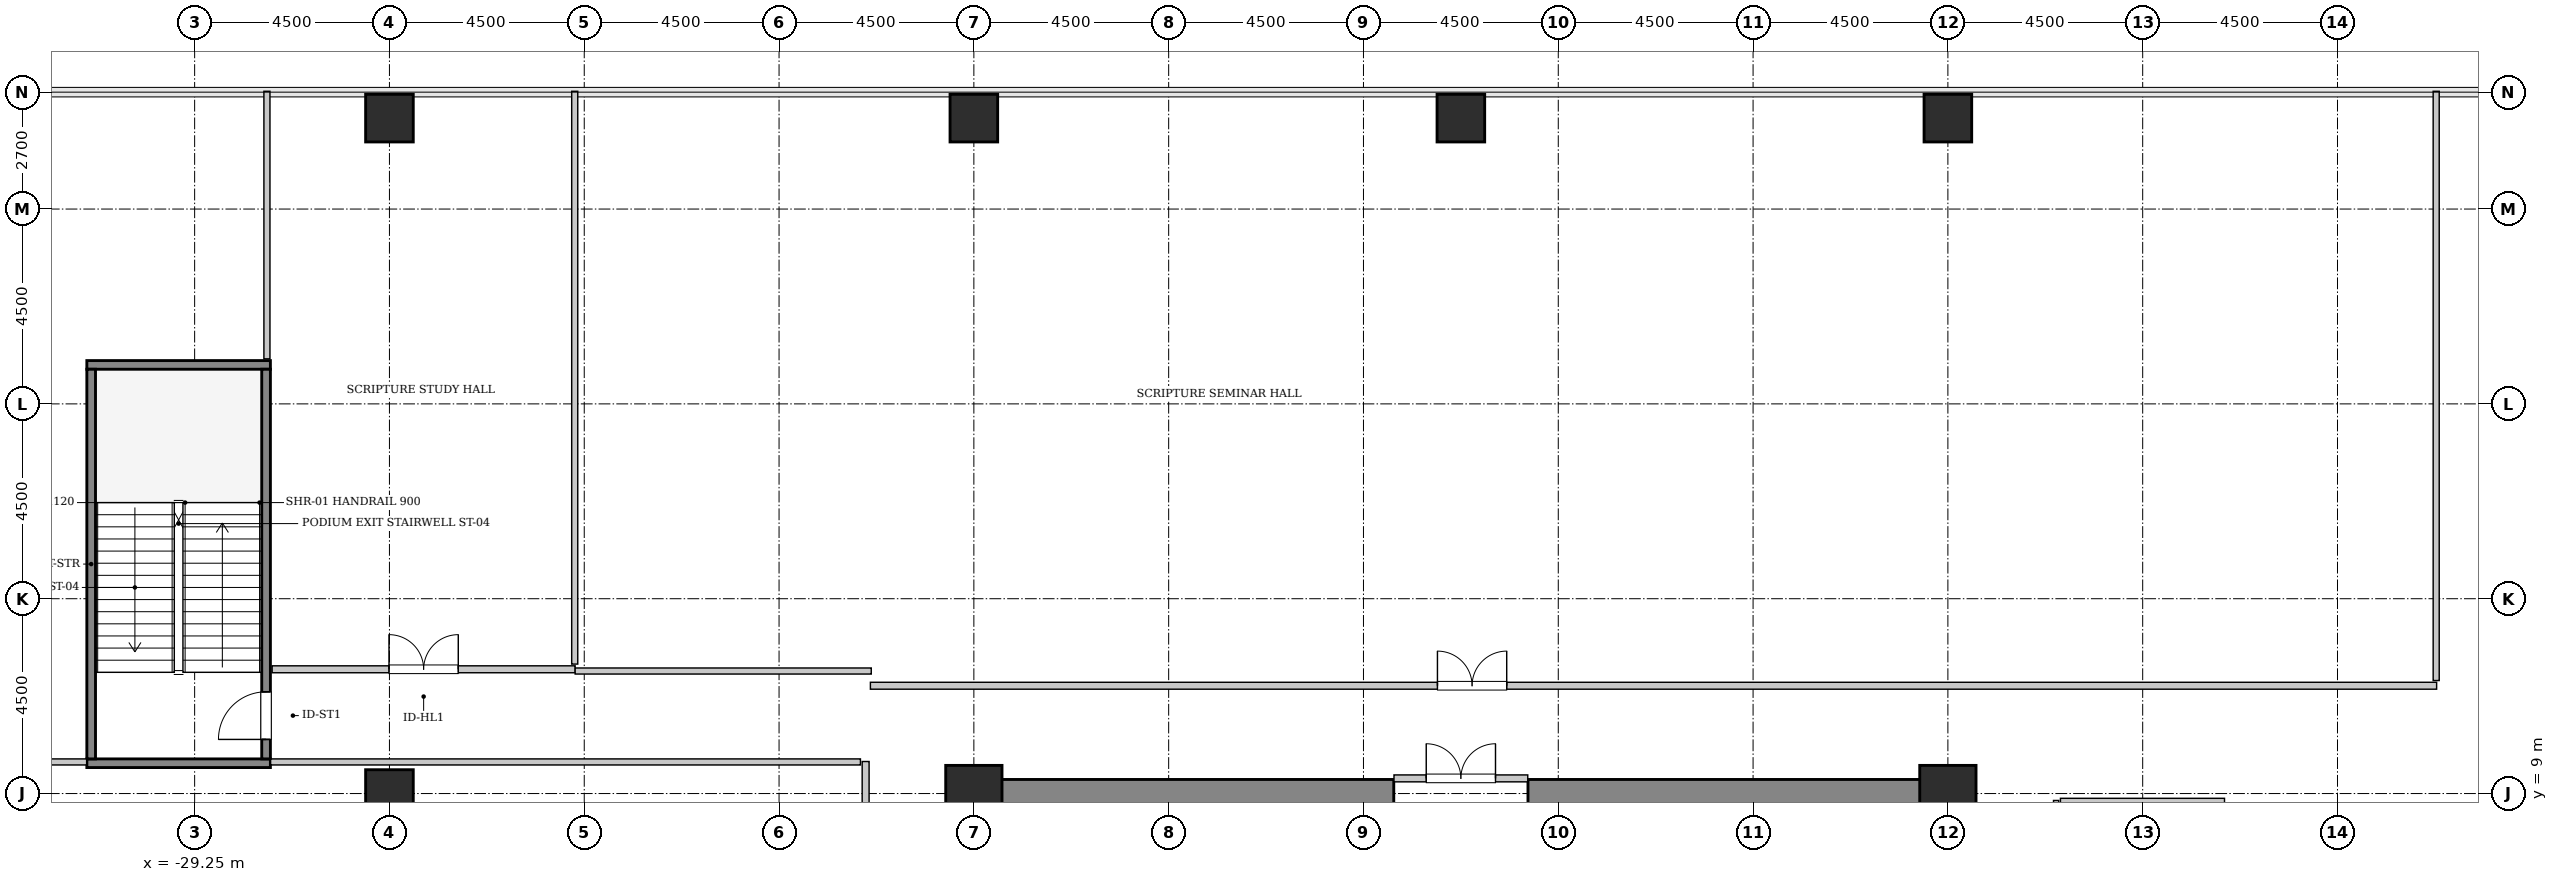
"""IFC4 building model, lengths in metres.
Left out: names, types, materials, properties, quantities, classifications, styles, units other than length and angle.
Written with IfcOpenShell. Run it as: python <this file> out.ifc"""

import sys

from ifc_helpers import new_model, si_unit, direction, frame, frame_2d, origin, origin_2d, place, context, subcontext, project, spatial, rectangle, hollow_rectangle, extrude, source, transform, mapped, element, fill, save


model = new_model("IFC4")
c1 = context("Model", 3, precision=1e-05, world=origin(), true_north=direction((0.0, 1.0)))
c2 = subcontext(c1, "Body", "Model", "MODEL_VIEW")
j1 = project(units=[si_unit("LENGTHUNIT", "METRE"), si_unit("PLANEANGLEUNIT", "RADIAN")], contexts=[c1])
p1 = place(None, origin())
s1 = spatial("IfcSite", under=j1, at=p1, CompositionType="ELEMENT")
p2 = place(p1, origin())
s2 = spatial("IfcBuilding", under=s1, at=p2, CompositionType="ELEMENT")
p3 = place(p2, frame((0.0, 0.0, 6.0)))
s3 = spatial("IfcBuildingStorey", under=s2, at=p3, CompositionType="ELEMENT", Elevation=6.0)
m1 = source(origin(), c2, "Body", "SweptSolid", [
    extrude(rectangle(XDim=10.025, YDim=0.65, at=frame_2d((5.012, 0.0))), origin(), (0.0, 0.0, 1.0), 5.4),
])
for number, where, z_axis, x_axis in (
    (1, (-11.575, 9.0, 0.0), (0.0, 0.0, 1.0), (1.0, 0.0, 0.0)),
    (2, (1.55, 9.0, 0.0), (0.0, 0.0, 1.0), (1.0, 0.0, 0.0)),
):
    element("IfcWall", number, at=place(p3, frame(where, z_axis=z_axis, x_axis=x_axis)), inside=s3, PredefinedType="SHEAR", context=c2, shape_type="MappedRepresentation", body=[
        mapped(m1, transform((0.0, 0.0, 0.0), x_axis=(1.0, 0.0, 0.0), y_axis=(0.0, 1.0, 0.0), z_axis=(0.0, 0.0, 1.0), scale=1.0)),
    ])
m2 = source(origin(), c2, "Body", "SweptSolid", [
    extrude(hollow_rectangle(XDim=1.1, YDim=1.1, WallThickness=0.055, InnerFilletRadius=0.055, OuterFilletRadius=0.11, at=origin_2d()), origin(), (0.0, 0.0, 1.0), 5.4),
])
p4 = place(p3, frame((-24.75, 9.0, 0.0), z_axis=(0.0, 0.0, 1.0), x_axis=(1.0, 0.0, 0.0)))
e3 = element("IfcColumn", 3, at=p4, inside=s3, PredefinedType="COLUMN", context=c2, shape_type="MappedRepresentation", body=[
    mapped(m2, transform((0.0, 0.0, 0.0), x_axis=(1.0, 0.0, 0.0), y_axis=(0.0, 1.0, 0.0), z_axis=(0.0, 0.0, 1.0), scale=1.0)),
])
m3 = source(origin(), c2, "Body", "SweptSolid", [
    extrude(hollow_rectangle(XDim=1.1, YDim=1.1, WallThickness=0.055, InnerFilletRadius=0.055, OuterFilletRadius=0.11, at=origin_2d()), origin(), (0.0, 0.0, 1.0), 5.4),
])
p5 = place(p3, frame((-24.75, 24.6, 0.0), z_axis=(0.0, 0.0, 1.0), x_axis=(1.0, 0.0, 0.0)))
e4 = element("IfcColumn", 4, at=p5, inside=s3, PredefinedType="COLUMN", context=c2, shape_type="MappedRepresentation", body=[
    mapped(m3, transform((0.0, 0.0, 0.0), x_axis=(1.0, 0.0, 0.0), y_axis=(0.0, 1.0, 0.0), z_axis=(0.0, 0.0, 1.0), scale=1.0)),
])
m4 = source(origin(), c2, "Body", "SweptSolid", [
    extrude(hollow_rectangle(XDim=1.3, YDim=1.3, WallThickness=0.065, InnerFilletRadius=0.065, OuterFilletRadius=0.13, at=origin_2d()), origin(), (0.0, 0.0, 1.0), 5.4),
])
p6 = place(p3, frame((-11.25, 9.0, 0.0), z_axis=(0.0, 0.0, 1.0), x_axis=(1.0, 0.0, 0.0)))
e5 = element("IfcColumn", 5, at=p6, inside=s3, PredefinedType="COLUMN", context=c2, shape_type="MappedRepresentation", body=[
    mapped(m4, transform((0.0, 0.0, 0.0), x_axis=(1.0, 0.0, 0.0), y_axis=(0.0, 1.0, 0.0), z_axis=(0.0, 0.0, 1.0), scale=1.0)),
])
for number, where, z_axis, x_axis in (
    (6, (-11.25, 24.6, 0.0), (0.0, 0.0, 1.0), (1.0, 0.0, 0.0)),
    (7, (0.0, 24.6, 0.0), (0.0, 0.0, 1.0), (1.0, 0.0, 0.0)),
):
    element("IfcColumn", number, at=place(p3, frame(where, z_axis=z_axis, x_axis=x_axis)), inside=s3, PredefinedType="COLUMN", context=c2, shape_type="MappedRepresentation", body=[
        mapped(m3, transform((0.0, 0.0, 0.0), x_axis=(1.0, 0.0, 0.0), y_axis=(0.0, 1.0, 0.0), z_axis=(0.0, 0.0, 1.0), scale=1.0)),
    ])
p7 = place(p3, frame((11.25, 9.0, 0.0), z_axis=(0.0, 0.0, 1.0), x_axis=(1.0, 0.0, 0.0)))
e8 = element("IfcColumn", 8, at=p7, inside=s3, PredefinedType="COLUMN", context=c2, shape_type="MappedRepresentation", body=[
    mapped(m4, transform((0.0, 0.0, 0.0), x_axis=(1.0, 0.0, 0.0), y_axis=(0.0, 1.0, 0.0), z_axis=(0.0, 0.0, 1.0), scale=1.0)),
])
p8 = place(p3, frame((11.25, 24.6, 0.0), z_axis=(0.0, 0.0, 1.0), x_axis=(1.0, 0.0, 0.0)))
e9 = element("IfcColumn", 9, at=p8, inside=s3, PredefinedType="COLUMN", context=c2, shape_type="MappedRepresentation", body=[
    mapped(m3, transform((0.0, 0.0, 0.0), x_axis=(1.0, 0.0, 0.0), y_axis=(0.0, 1.0, 0.0), z_axis=(0.0, 0.0, 1.0), scale=1.0)),
])
m5 = source(origin(), c2, "Body", "SweptSolid", [
    extrude(rectangle(XDim=4.24, YDim=0.2, at=frame_2d((2.12, 0.0))), origin(), (0.0, 0.0, 1.0), 5.4),
])
for number, where, z_axis, x_axis in (
    (10, (-27.5, 9.7, 0.0), (0.0, 0.0, 1.0), (-1.0, 0.0, 0.0)),
    (11, (-27.5, 18.9, 0.0), (0.0, 0.0, 1.0), (-1.0, 0.0, 0.0)),
):
    element("IfcWall", number, at=place(p3, frame(where, z_axis=z_axis, x_axis=x_axis)), inside=s3, PredefinedType="SOLIDWALL", context=c2, shape_type="MappedRepresentation", body=[
        mapped(m5, transform((0.0, 0.0, 0.0), x_axis=(1.0, 0.0, 0.0), y_axis=(0.0, 1.0, 0.0), z_axis=(0.0, 0.0, 1.0), scale=1.0)),
    ])
m6 = source(origin(), c2, "Body", "SweptSolid", [
    extrude(rectangle(XDim=9.0, YDim=0.2, at=frame_2d((4.5, 0.0))), origin(), (0.0, 0.0, 1.0), 5.4),
])
p9 = place(p3, frame((-27.6, 9.8, 0.0), z_axis=(0.0, 0.0, 1.0), x_axis=(0.0, 1.0, 0.0)))
e12 = element("IfcWall", 12, at=p9, inside=s3, PredefinedType="SOLIDWALL", context=c2, shape_type="MappedRepresentation", body=[
    mapped(m6, transform((0.0, 0.0, 0.0), x_axis=(1.0, 0.0, 0.0), y_axis=(0.0, 1.0, 0.0), z_axis=(0.0, 0.0, 1.0), scale=1.0)),
])
p10 = place(p9, frame((0.45, 0.0, 0.0)))
e13 = element("IfcOpeningElement", 13, at=p10, cuts=e12, PredefinedType="OPENING", context=c2, shape_type="SweptSolid", body=[
    extrude(rectangle(XDim=1.1, YDim=2.15, at=frame_2d((0.55, 1.075))), frame((0.0, 0.11, 0.0), z_axis=(0.0, -1.0, 0.0), x_axis=(1.0, 0.0, 0.0)), (0.0, 0.0, 1.0), 0.22),
])
p11 = place(p3, frame((-31.64, 9.8, 0.0), z_axis=(0.0, 0.0, 1.0), x_axis=(0.0, 1.0, 0.0)))
e14 = element("IfcWall", 14, at=p11, inside=s3, PredefinedType="SOLIDWALL", context=c2, shape_type="MappedRepresentation", body=[
    mapped(m6, transform((0.0, 0.0, 0.0), x_axis=(1.0, 0.0, 0.0), y_axis=(0.0, 1.0, 0.0), z_axis=(0.0, 0.0, 1.0), scale=1.0)),
])
m7 = source(origin(), c2, "Body", "SweptSolid", [
    extrude(rectangle(XDim=3.09, YDim=0.16, at=frame_2d((1.545, 0.0))), origin(), (0.0, 0.0, 1.0), 3.975),
])
p12 = place(p3, frame((-1.545, 9.35, 0.0), z_axis=(0.0, 0.0, 1.0), x_axis=(1.0, 0.0, 0.0)))
e15 = element("IfcWall", 15, at=p12, inside=s3, PredefinedType="PARTITIONING", context=c2, shape_type="MappedRepresentation", body=[
    mapped(m7, transform((0.0, 0.0, 0.0), x_axis=(1.0, 0.0, 0.0), y_axis=(0.0, 1.0, 0.0), z_axis=(0.0, 0.0, 1.0), scale=1.0)),
])
p13 = place(p12, frame((0.745, 0.0, 0.0)))
e16 = element("IfcOpeningElement", 16, at=p13, cuts=e15, PredefinedType="OPENING", context=c2, shape_type="SweptSolid", body=[
    extrude(rectangle(XDim=1.6, YDim=2.3, at=frame_2d((0.8, 1.15))), frame((0.0, 0.09, 0.0), z_axis=(0.0, -1.0, 0.0), x_axis=(1.0, 0.0, 0.0)), (0.0, 0.0, 1.0), 0.18),
])
m8 = source(origin(), c2, "Body", "SweptSolid", [
    extrude(rectangle(XDim=3.68, YDim=0.12, at=frame_2d((1.84, 0.0))), origin(), (0.0, 0.0, 1.0), 5.085),
])
p14 = place(p3, frame((13.75, 5.16, 0.0), z_axis=(0.0, 0.0, 1.0), x_axis=(0.0, 1.0, 0.0)))
e17 = element("IfcWall", 17, at=p14, inside=s3, PredefinedType="PLUMBINGWALL", context=c2, shape_type="MappedRepresentation", body=[
    mapped(m8, transform((0.0, 0.0, 0.0), x_axis=(1.0, 0.0, 0.0), y_axis=(0.0, 1.0, 0.0), z_axis=(0.0, 0.0, 1.0), scale=1.0)),
])
p15 = place(p14, frame((1.415, 0.0, 0.0)))
e18 = element("IfcOpeningElement", 18, at=p15, cuts=e17, PredefinedType="OPENING", context=c2, shape_type="SweptSolid", body=[
    extrude(rectangle(XDim=0.85, YDim=2.1, at=frame_2d((0.425, 1.05))), frame((0.0, 0.07, 0.0), z_axis=(0.0, -1.0, 0.0), x_axis=(1.0, 0.0, 0.0)), (0.0, 0.0, 1.0), 0.14),
])
m9 = source(origin(), c2, "Body", "SweptSolid", [
    extrude(rectangle(XDim=3.79, YDim=0.12, at=frame_2d((1.895, 0.0))), origin(), (0.0, 0.0, 1.0), 4.075),
])
p16 = place(p3, frame((13.85, 8.83, 0.0), z_axis=(0.0, 0.0, 1.0), x_axis=(1.0, 0.0, 0.0)))
e19 = element("IfcWall", 19, at=p16, inside=s3, PredefinedType="PLUMBINGWALL", context=c2, shape_type="MappedRepresentation", body=[
    mapped(m9, transform((0.0, 0.0, 0.0), x_axis=(1.0, 0.0, 0.0), y_axis=(0.0, 1.0, 0.0), z_axis=(0.0, 0.0, 1.0), scale=1.0)),
])
m10 = source(origin(), c2, "Body", "SweptSolid", [
    extrude(rectangle(XDim=19.48, YDim=0.16, at=frame_2d((9.74, 0.0))), origin(), (0.0, 0.0, 1.0), 5.085),
])
p17 = place(p3, frame((-13.75, -9.74, 0.0), z_axis=(0.0, 0.0, 1.0), x_axis=(0.0, 1.0, 0.0)))
e20 = element("IfcWall", 20, at=p17, inside=s3, PredefinedType="PARTITIONING", context=c2, shape_type="MappedRepresentation", body=[
    mapped(m10, transform((0.0, 0.0, 0.0), x_axis=(1.0, 0.0, 0.0), y_axis=(0.0, 1.0, 0.0), z_axis=(0.0, 0.0, 1.0), scale=1.0)),
])
p18 = place(p17, frame((8.94, 0.0, 0.0)))
e21 = element("IfcOpeningElement", 21, at=p18, cuts=e20, PredefinedType="OPENING", context=c2, shape_type="SweptSolid", body=[
    extrude(rectangle(XDim=1.6, YDim=2.3, at=frame_2d((0.8, 1.15))), frame((0.0, 0.09, 0.0), z_axis=(0.0, -1.0, 0.0), x_axis=(1.0, 0.0, 0.0)), (0.0, 0.0, 1.0), 0.18),
])
m11 = source(origin(), c2, "Body", "SweptSolid", [
    extrude(rectangle(XDim=13.625, YDim=0.14, at=frame_2d((6.812, 0.0))), origin(), (0.0, 0.0, 1.0), 5.085),
])
p19 = place(p3, frame((-27.495, 9.73, 0.0), z_axis=(0.0, 0.0, 1.0), x_axis=(1.0, 0.0, 0.0)))
e22 = element("IfcWall", 22, at=p19, inside=s3, PredefinedType="PARTITIONING", context=c2, shape_type="MappedRepresentation", body=[
    mapped(m11, transform((0.0, 0.0, 0.0), x_axis=(1.0, 0.0, 0.0), y_axis=(0.0, 1.0, 0.0), z_axis=(0.0, 0.0, 1.0), scale=1.0)),
])
m12 = source(origin(), c2, "Body", "SweptSolid", [
    extrude(rectangle(XDim=6.525, YDim=0.14, at=frame_2d((3.262, 0.0))), origin(), (0.0, 0.0, 1.0), 5.085),
])
p20 = place(p3, frame((-38.27, 9.73, 0.0), z_axis=(0.0, 0.0, 1.0), x_axis=(1.0, 0.0, 0.0)))
e23 = element("IfcWall", 23, at=p20, inside=s3, PredefinedType="PARTITIONING", context=c2, shape_type="MappedRepresentation", body=[
    mapped(m12, transform((0.0, 0.0, 0.0), x_axis=(1.0, 0.0, 0.0), y_axis=(0.0, 1.0, 0.0), z_axis=(0.0, 0.0, 1.0), scale=1.0)),
])
m13 = source(origin(), c2, "Body", "SweptSolid", [
    extrude(rectangle(XDim=7.0, YDim=0.16, at=frame_2d((3.5, 0.0))), origin(), (0.0, 0.0, 1.0), 5.085),
])
p21 = place(p3, frame((-27.46, 11.87, 0.0), z_axis=(0.0, 0.0, 1.0), x_axis=(1.0, 0.0, 0.0)))
e24 = element("IfcWall", 24, at=p21, inside=s3, PredefinedType="PARTITIONING", context=c2, shape_type="MappedRepresentation", body=[
    mapped(m13, transform((0.0, 0.0, 0.0), x_axis=(1.0, 0.0, 0.0), y_axis=(0.0, 1.0, 0.0), z_axis=(0.0, 0.0, 1.0), scale=1.0)),
])
p22 = place(p21, frame((2.7, 0.0, 0.0)))
e25 = element("IfcOpeningElement", 25, at=p22, cuts=e24, PredefinedType="OPENING", context=c2, shape_type="SweptSolid", body=[
    extrude(rectangle(XDim=1.6, YDim=2.3, at=frame_2d((0.8, 1.15))), frame((0.0, 0.09, 0.0), z_axis=(0.0, -1.0, 0.0), x_axis=(1.0, 0.0, 0.0)), (0.0, 0.0, 1.0), 0.18),
])
m14 = source(origin(), c2, "Body", "SweptSolid", [
    extrude(rectangle(XDim=6.18, YDim=0.14, at=frame_2d((3.09, 0.0))), origin(), (0.0, 0.0, 1.0), 5.085),
])
p23 = place(p3, frame((-27.58, 19.04, 0.0), z_axis=(0.0, 0.0, 1.0), x_axis=(0.0, 1.0, 0.0)))
e26 = element("IfcWall", 26, at=p23, inside=s3, PredefinedType="PARTITIONING", context=c2, shape_type="MappedRepresentation", body=[
    mapped(m14, transform((0.0, 0.0, 0.0), x_axis=(1.0, 0.0, 0.0), y_axis=(0.0, 1.0, 0.0), z_axis=(0.0, 0.0, 1.0), scale=1.0)),
])
m15 = source(origin(), c2, "Body", "SweptSolid", [
    extrude(rectangle(XDim=13.23, YDim=0.14, at=frame_2d((6.615, 0.0))), origin(), (0.0, 0.0, 1.0), 5.085),
])
p24 = place(p3, frame((-20.47, 11.99, 0.0), z_axis=(0.0, 0.0, 1.0), x_axis=(0.0, 1.0, 0.0)))
e27 = element("IfcWall", 27, at=p24, inside=s3, PredefinedType="PARTITIONING", context=c2, shape_type="MappedRepresentation", body=[
    mapped(m15, transform((0.0, 0.0, 0.0), x_axis=(1.0, 0.0, 0.0), y_axis=(0.0, 1.0, 0.0), z_axis=(0.0, 0.0, 1.0), scale=1.0)),
])
m16 = source(origin(), c2, "Body", "SweptSolid", [
    extrude(rectangle(XDim=36.18, YDim=0.16, at=frame_2d((18.09, 0.0))), origin(), (0.0, 0.0, 1.0), 5.085),
])
p25 = place(p3, frame((-13.64, 11.49, 0.0), z_axis=(0.0, 0.0, 1.0), x_axis=(1.0, 0.0, 0.0)))
e28 = element("IfcWall", 28, at=p25, inside=s3, PredefinedType="PARTITIONING", context=c2, shape_type="MappedRepresentation", body=[
    mapped(m16, transform((0.0, 0.0, 0.0), x_axis=(1.0, 0.0, 0.0), y_axis=(0.0, 1.0, 0.0), z_axis=(0.0, 0.0, 1.0), scale=1.0)),
])
p26 = place(p25, frame((13.099, 0.0, 0.0)))
e29 = element("IfcOpeningElement", 29, at=p26, cuts=e28, PredefinedType="OPENING", context=c2, shape_type="SweptSolid", body=[
    extrude(rectangle(XDim=1.6, YDim=2.3, at=frame_2d((0.8, 1.15))), frame((0.0, 0.09, 0.0), z_axis=(0.0, -1.0, 0.0), x_axis=(1.0, 0.0, 0.0)), (0.0, 0.0, 1.0), 0.18),
])
m17 = source(origin(), c2, "Body", "SweptSolid", [
    extrude(rectangle(XDim=6.84, YDim=0.14, at=frame_2d((3.42, 0.0))), origin(), (0.0, 0.0, 1.0), 5.085),
])
p27 = place(p3, frame((-20.46, 11.83, 0.0), z_axis=(0.0, 0.0, 1.0), x_axis=(1.0, 0.0, 0.0)))
e30 = element("IfcWall", 30, at=p27, inside=s3, PredefinedType="PARTITIONING", context=c2, shape_type="MappedRepresentation", body=[
    mapped(m17, transform((0.0, 0.0, 0.0), x_axis=(1.0, 0.0, 0.0), y_axis=(0.0, 1.0, 0.0), z_axis=(0.0, 0.0, 1.0), scale=1.0)),
])
m18 = source(origin(), c2, "Body", "SweptSolid", [
    extrude(rectangle(XDim=13.61, YDim=0.14, at=frame_2d((6.805, 0.0))), origin(), (0.0, 0.0, 1.0), 5.085),
])
p28 = place(p3, frame((22.53, 11.61, 0.0), z_axis=(0.0, 0.0, 1.0), x_axis=(0.0, 1.0, 0.0)))
e31 = element("IfcWall", 31, at=p28, inside=s3, PredefinedType="PARTITIONING", context=c2, shape_type="MappedRepresentation", body=[
    mapped(m18, transform((0.0, 0.0, 0.0), x_axis=(1.0, 0.0, 0.0), y_axis=(0.0, 1.0, 0.0), z_axis=(0.0, 0.0, 1.0), scale=1.0)),
])
m19 = source(origin(), c2, "Body", "SweptSolid", [
    extrude(rectangle(XDim=1.1, YDim=2.15, at=frame_2d((0.55, 1.075))), frame((0.0, 0.025, 0.0), z_axis=(0.0, -1.0, 0.0), x_axis=(1.0, 0.0, 0.0)), (0.0, 0.0, 1.0), 0.05),
])
p29 = place(p10, origin())
e32 = element("IfcDoor", 32, at=p29, inside=s3, OperationType="SINGLE_SWING_LEFT", PredefinedType="DOOR", context=c2, shape_type="MappedRepresentation", body=[
    mapped(m19, transform((0.0, 0.0, 0.0), x_axis=(1.0, 0.0, 0.0), y_axis=(0.0, 1.0, 0.0), z_axis=(0.0, 0.0, 1.0), scale=1.0)),
])
fill(e13, e32)
m20 = source(origin(), c2, "Body", "SweptSolid", [
    extrude(rectangle(XDim=1.6, YDim=2.3, at=frame_2d((0.8, 1.15))), frame((0.0, 0.025, 0.0), z_axis=(0.0, -1.0, 0.0), x_axis=(1.0, 0.0, 0.0)), (0.0, 0.0, 1.0), 0.05),
])
p30 = place(p13, origin())
e33 = element("IfcDoor", 33, at=p30, inside=s3, OperationType="DOUBLE_DOOR_SINGLE_SWING", PredefinedType="DOOR", context=c2, shape_type="MappedRepresentation", body=[
    mapped(m20, transform((0.0, 0.0, 0.0), x_axis=(1.0, 0.0, 0.0), y_axis=(0.0, 1.0, 0.0), z_axis=(0.0, 0.0, 1.0), scale=1.0)),
])
fill(e16, e33)
p31 = place(p22, origin())
e34 = element("IfcDoor", 34, at=p31, inside=s3, OperationType="DOUBLE_DOOR_SINGLE_SWING", PredefinedType="DOOR", context=c2, shape_type="MappedRepresentation", body=[
    mapped(m20, transform((0.0, 0.0, 0.0), x_axis=(1.0, 0.0, 0.0), y_axis=(0.0, 1.0, 0.0), z_axis=(0.0, 0.0, 1.0), scale=1.0)),
])
fill(e25, e34)
p32 = place(p26, origin())
e35 = element("IfcDoor", 35, at=p32, inside=s3, OperationType="DOUBLE_DOOR_SINGLE_SWING", PredefinedType="DOOR", context=c2, shape_type="MappedRepresentation", body=[
    mapped(m20, transform((0.0, 0.0, 0.0), x_axis=(1.0, 0.0, 0.0), y_axis=(0.0, 1.0, 0.0), z_axis=(0.0, 0.0, 1.0), scale=1.0)),
])
fill(e29, e35)
save(model, sys.argv[1])
